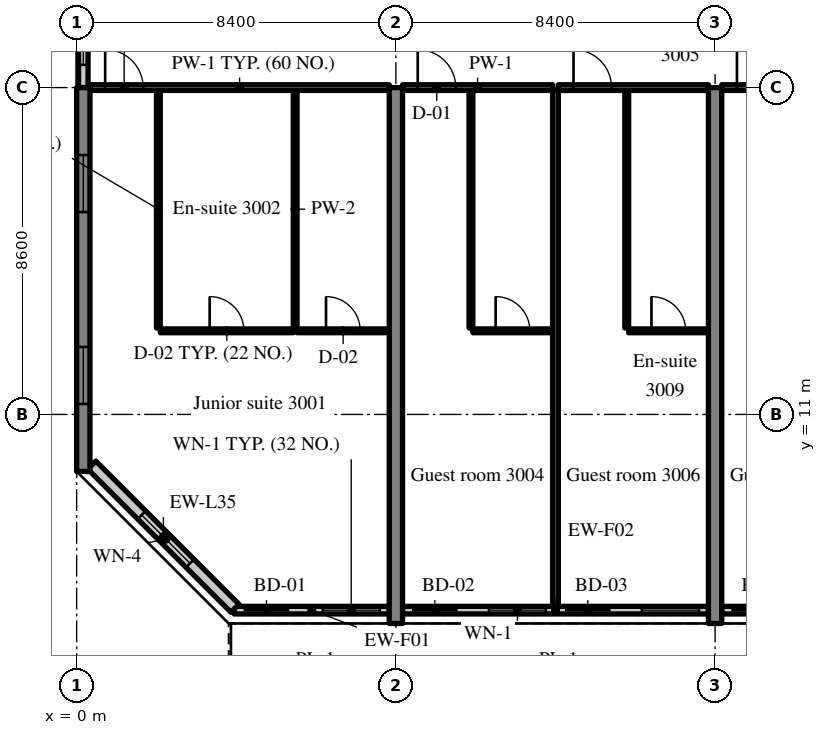
"""IFC4 building model, lengths in metres.
Left out: names, types, materials, properties, quantities, classifications, styles, units other than length and angle.
Written with IfcOpenShell. Run it as: python <this file> out.ifc"""

import sys

from ifc_helpers import new_model, si_unit, direction, frame, frame_2d, origin, place, context, subcontext, project, spatial, rectangle, extrude, source, transform, mapped, element, fill, save


model = new_model("IFC4")
c1 = context("Model", 3, precision=1e-05, world=origin(), true_north=direction((0.0, 1.0)))
c2 = subcontext(c1, "Body", "Model", "MODEL_VIEW")
j1 = project(units=[si_unit("LENGTHUNIT", "METRE"), si_unit("PLANEANGLEUNIT", "RADIAN")], contexts=[c1])
p1 = place(None, origin())
s1 = spatial("IfcSite", under=j1, at=p1, CompositionType="ELEMENT")
p2 = place(p1, origin())
s2 = spatial("IfcBuilding", under=s1, at=p2, CompositionType="ELEMENT")
p3 = place(p2, frame((0.0, 0.0, 125.6)))
s3 = spatial("IfcBuildingStorey", under=s2, at=p3, CompositionType="ELEMENT", Elevation=125.6)
m1 = source(origin(), c2, "Body", "SweptSolid", [
    extrude(rectangle(XDim=10.1, YDim=0.35, at=frame_2d((5.05, 0.0))), origin(), (0.0, 0.0, 1.0), 3.52),
])
p4 = place(p3, frame((0.175, 9.5, 0.0), z_axis=(0.0, 0.0, 1.0), x_axis=(0.0, 1.0, 0.0)))
e1 = element("IfcWall", 1, at=p4, inside=s3, PredefinedType="SHEAR", context=c2, shape_type="MappedRepresentation", body=[
    mapped(m1, transform((0.0, 0.0, 0.0), scale=1.0)),
])
m2 = source(origin(), c2, "Body", "SweptSolid", [
    extrude(rectangle(XDim=1.5, YDim=1.5, at=frame_2d((0.75, 0.75))), frame((0.0, 0.185, 0.0), z_axis=(0.0, -1.0, 0.0), x_axis=(1.0, 0.0, 0.0)), (0.0, 0.0, 1.0), 0.37),
])
p5 = place(p4, frame((1.775, 0.0, 0.9)))
e2 = element("IfcOpeningElement", 2, at=p5, cuts=e1, PredefinedType="OPENING", context=c2, shape_type="MappedRepresentation", body=[
    mapped(m2, transform((0.0, 0.0, 0.0), scale=1.0)),
])
p6 = place(p4, frame((6.825, 0.0, 0.9)))
e3 = element("IfcOpeningElement", 3, at=p6, cuts=e1, PredefinedType="OPENING", context=c2, shape_type="MappedRepresentation", body=[
    mapped(m2, transform((0.0, 0.0, 0.0), scale=1.0)),
])
m3 = source(origin(), c2, "Body", "SweptSolid", [
    extrude(rectangle(XDim=14.1, YDim=0.35, at=frame_2d((7.05, 0.0))), origin(), (0.0, 0.0, 1.0), 3.52),
])
for number, where, z_axis, x_axis in (
    (4, (8.4, 5.5, 0.0), (0.0, 0.0, 1.0), (0.0, 1.0, 0.0)),
    (5, (16.8, 5.5, 0.0), (0.0, 0.0, 1.0), (0.0, 1.0, 0.0)),
):
    element("IfcWall", number, at=place(p3, frame(where, z_axis=z_axis, x_axis=x_axis)), inside=s3, PredefinedType="SHEAR", context=c2, shape_type="MappedRepresentation", body=[
        mapped(m3, transform((0.0, 0.0, 0.0), scale=1.0)),
    ])
m4 = source(origin(), c2, "Body", "SweptSolid", [
    extrude(rectangle(XDim=4.08, YDim=0.2, at=frame_2d((2.04, 0.0))), origin(), (0.0, 0.0, 1.0), 2.82),
])
p7 = place(p3, frame((4.145, 5.85, 0.0), z_axis=(0.0, 0.0, 1.0), x_axis=(1.0, 0.0, 0.0)))
e6 = element("IfcWall", 6, at=p7, inside=s3, PredefinedType="SOLIDWALL", context=c2, shape_type="MappedRepresentation", body=[
    mapped(m4, transform((0.0, 0.0, 0.0), scale=1.0)),
])
m5 = source(origin(), c2, "Body", "SweptSolid", [
    extrude(rectangle(XDim=1.2, YDim=2.4, at=frame_2d((0.6, 1.2))), frame((0.0, 0.11, 0.0), z_axis=(0.0, -1.0, 0.0), x_axis=(1.0, 0.0, 0.0)), (0.0, 0.0, 1.0), 0.22),
])
p8 = place(p7, frame((0.25, 0.0, 0.0)))
e7 = element("IfcOpeningElement", 7, at=p8, cuts=e6, PredefinedType="OPENING", context=c2, shape_type="MappedRepresentation", body=[
    mapped(m5, transform((0.0, 0.0, 0.0), scale=1.0)),
])
m6 = source(origin(), c2, "Body", "SweptSolid", [
    extrude(rectangle(XDim=1.5, YDim=1.5, at=frame_2d((0.75, 0.75))), frame((0.0, 0.11, 0.0), z_axis=(0.0, -1.0, 0.0), x_axis=(1.0, 0.0, 0.0)), (0.0, 0.0, 1.0), 0.22),
])
p9 = place(p7, frame((2.33, 0.0, 0.9)))
e8 = element("IfcOpeningElement", 8, at=p9, cuts=e6, PredefinedType="OPENING", context=c2, shape_type="MappedRepresentation", body=[
    mapped(m6, transform((0.0, 0.0, 0.0), scale=1.0)),
])
m7 = source(origin(), c2, "Body", "SweptSolid", [
    extrude(rectangle(XDim=8.05, YDim=0.2, at=frame_2d((4.025, 0.0))), origin(), (0.0, 0.0, 1.0), 2.82),
])
p10 = place(p3, frame((8.575, 5.85, 0.0), z_axis=(0.0, 0.0, 1.0), x_axis=(1.0, 0.0, 0.0)))
e9 = element("IfcWall", 9, at=p10, inside=s3, PredefinedType="SOLIDWALL", context=c2, shape_type="MappedRepresentation", body=[
    mapped(m7, transform((0.0, 0.0, 0.0), scale=1.0)),
])
p11 = place(p10, frame((0.25, 0.0, 0.0)))
e10 = element("IfcOpeningElement", 10, at=p11, cuts=e9, PredefinedType="OPENING", context=c2, shape_type="MappedRepresentation", body=[
    mapped(m5, transform((0.0, 0.0, 0.0), scale=1.0)),
])
p12 = place(p10, frame((2.275, 0.0, 0.9)))
e11 = element("IfcOpeningElement", 11, at=p12, cuts=e9, PredefinedType="OPENING", context=c2, shape_type="MappedRepresentation", body=[
    mapped(m6, transform((0.0, 0.0, 0.0), scale=1.0)),
])
p13 = place(p10, frame((4.275, 0.0, 0.0)))
e12 = element("IfcOpeningElement", 12, at=p13, cuts=e9, PredefinedType="OPENING", context=c2, shape_type="MappedRepresentation", body=[
    mapped(m5, transform((0.0, 0.0, 0.0), scale=1.0)),
])
p14 = place(p10, frame((6.3, 0.0, 0.9)))
e13 = element("IfcOpeningElement", 13, at=p14, cuts=e9, PredefinedType="OPENING", context=c2, shape_type="MappedRepresentation", body=[
    mapped(m6, transform((0.0, 0.0, 0.0), scale=1.0)),
])
m8 = source(origin(), c2, "Body", "SweptSolid", [
    extrude(rectangle(XDim=8.05, YDim=0.2, at=frame_2d((4.025, 0.0))), origin(), (0.0, 0.0, 1.0), 2.82),
])
p15 = place(p3, frame((16.975, 5.85, 0.0), z_axis=(0.0, 0.0, 1.0), x_axis=(1.0, 0.0, 0.0)))
e14 = element("IfcWall", 14, at=p15, inside=s3, PredefinedType="SOLIDWALL", context=c2, shape_type="MappedRepresentation", body=[
    mapped(m8, transform((0.0, 0.0, 0.0), scale=1.0)),
])
p16 = place(p15, frame((0.25, 0.0, 0.0)))
e15 = element("IfcOpeningElement", 15, at=p16, cuts=e14, PredefinedType="OPENING", context=c2, shape_type="MappedRepresentation", body=[
    mapped(m5, transform((0.0, 0.0, 0.0), scale=1.0)),
])
p17 = place(p15, frame((2.275, 0.0, 0.9)))
e16 = element("IfcOpeningElement", 16, at=p17, cuts=e14, PredefinedType="OPENING", context=c2, shape_type="MappedRepresentation", body=[
    mapped(m6, transform((0.0, 0.0, 0.0), scale=1.0)),
])
p18 = place(p15, frame((4.275, 0.0, 0.0)))
e17 = element("IfcOpeningElement", 17, at=p18, cuts=e14, PredefinedType="OPENING", context=c2, shape_type="MappedRepresentation", body=[
    mapped(m5, transform((0.0, 0.0, 0.0), scale=1.0)),
])
p19 = place(p15, frame((6.3, 0.0, 0.9)))
e18 = element("IfcOpeningElement", 18, at=p19, cuts=e14, PredefinedType="OPENING", context=c2, shape_type="MappedRepresentation", body=[
    mapped(m6, transform((0.0, 0.0, 0.0), scale=1.0)),
])
m9 = source(origin(), c2, "Body", "SweptSolid", [
    extrude(rectangle(XDim=5.326, YDim=0.3, at=frame_2d((2.663, 0.0))), origin(), (0.0, 0.0, 1.0), 3.52),
])
p20 = place(p3, frame((0.4, 9.666, 0.0), z_axis=(0.0, 0.0, 1.0), x_axis=(0.707106781187, -0.707106781187, 0.0)))
e19 = element("IfcWall", 19, at=p20, inside=s3, PredefinedType="SOLIDWALL", context=c2, shape_type="MappedRepresentation", body=[
    mapped(m9, transform((0.0, 0.0, 0.0), scale=1.0)),
])
m10 = source(origin(), c2, "Body", "SweptSolid", [
    extrude(rectangle(XDim=1.8, YDim=1.5, at=frame_2d((0.9, 0.75))), frame((0.0, 0.16, 0.0), z_axis=(0.0, -1.0, 0.0), x_axis=(1.0, 0.0, 0.0)), (0.0, 0.0, 1.0), 0.32),
])
p21 = place(p20, frame((1.854, 0.0, 0.9)))
e20 = element("IfcOpeningElement", 20, at=p21, cuts=e19, PredefinedType="OPENING", context=c2, shape_type="MappedRepresentation", body=[
    mapped(m10, transform((0.0, 0.0, 0.0), scale=1.0)),
])
m11 = source(origin(), c2, "Body", "SweptSolid", [
    extrude(rectangle(XDim=2.4, YDim=0.25, at=frame_2d((1.2, 0.0))), origin(), (0.0, 0.0, 1.0), 2.62),
])
p22 = place(p3, frame((0.175, 19.6, 0.0), z_axis=(0.0, 0.0, 1.0), x_axis=(0.0, 1.0, 0.0)))
e21 = element("IfcWall", 21, at=p22, inside=s3, PredefinedType="SOLIDWALL", context=c2, shape_type="MappedRepresentation", body=[
    mapped(m11, transform((0.0, 0.0, 0.0), scale=1.0)),
])
m12 = source(origin(), c2, "Body", "SweptSolid", [
    extrude(rectangle(XDim=1.2, YDim=1.5, at=frame_2d((0.6, 0.75))), frame((0.0, 0.135, 0.0), z_axis=(0.0, -1.0, 0.0), x_axis=(1.0, 0.0, 0.0)), (0.0, 0.0, 1.0), 0.27),
])
p23 = place(p22, frame((0.6, 0.0, 0.9)))
e22 = element("IfcOpeningElement", 22, at=p23, cuts=e21, PredefinedType="OPENING", context=c2, shape_type="MappedRepresentation", body=[
    mapped(m12, transform((0.0, 0.0, 0.0), scale=1.0)),
])
m13 = source(origin(), c2, "Body", "SweptSolid", [
    extrude(rectangle(XDim=6.25, YDim=0.1, at=frame_2d((3.125, 0.0))), origin(), (0.0, 0.0, 1.0), 3.52),
])
for number, where, z_axis, x_axis in (
    (23, (2.15, 13.275, 0.0), (0.0, 0.0, 1.0), (0.0, 1.0, 0.0)),
    (24, (5.75, 13.275, 0.0), (0.0, 0.0, 1.0), (0.0, 1.0, 0.0)),
):
    element("IfcWall", number, at=place(p3, frame(where, z_axis=z_axis, x_axis=x_axis)), inside=s3, PredefinedType="PARTITIONING", context=c2, shape_type="MappedRepresentation", body=[
        mapped(m13, transform((0.0, 0.0, 0.0), scale=1.0)),
    ])
m14 = source(origin(), c2, "Body", "SweptSolid", [
    extrude(rectangle(XDim=3.5, YDim=0.1, at=frame_2d((1.75, 0.0))), origin(), (0.0, 0.0, 1.0), 3.52),
])
p24 = place(p3, frame((2.2, 13.2, 0.0), z_axis=(0.0, 0.0, 1.0), x_axis=(1.0, 0.0, 0.0)))
e25 = element("IfcWall", 25, at=p24, inside=s3, PredefinedType="PARTITIONING", context=c2, shape_type="MappedRepresentation", body=[
    mapped(m14, transform((0.0, 0.0, 0.0), scale=1.0)),
])
m15 = source(origin(), c2, "Body", "SweptSolid", [
    extrude(rectangle(XDim=0.9, YDim=2.1, at=frame_2d((0.45, 1.05))), frame((0.0, 0.06, 0.0), z_axis=(0.0, -1.0, 0.0), x_axis=(1.0, 0.0, 0.0)), (0.0, 0.0, 1.0), 0.12),
])
p25 = place(p24, frame((1.3, 0.0, 0.0)))
e26 = element("IfcOpeningElement", 26, at=p25, cuts=e25, PredefinedType="OPENING", context=c2, shape_type="MappedRepresentation", body=[
    mapped(m15, transform((0.0, 0.0, 0.0), scale=1.0)),
])
m16 = source(origin(), c2, "Body", "SweptSolid", [
    extrude(rectangle(XDim=2.425, YDim=0.1, at=frame_2d((1.212, 0.0))), origin(), (0.0, 0.0, 1.0), 3.52),
])
p26 = place(p3, frame((5.8, 13.2, 0.0), z_axis=(0.0, 0.0, 1.0), x_axis=(1.0, 0.0, 0.0)))
e27 = element("IfcWall", 27, at=p26, inside=s3, PredefinedType="PARTITIONING", context=c2, shape_type="MappedRepresentation", body=[
    mapped(m16, transform((0.0, 0.0, 0.0), scale=1.0)),
])
p27 = place(p26, frame((0.762, 0.0, 0.0)))
e28 = element("IfcOpeningElement", 28, at=p27, cuts=e27, PredefinedType="OPENING", context=c2, shape_type="MappedRepresentation", body=[
    mapped(m15, transform((0.0, 0.0, 0.0), scale=1.0)),
])
m17 = source(origin(), c2, "Body", "SweptSolid", [
    extrude(rectangle(XDim=7.875, YDim=0.15, at=frame_2d((3.938, 0.0))), origin(), (0.0, 0.0, 1.0), 2.82),
])
p28 = place(p3, frame((0.35, 19.6, 0.0), z_axis=(0.0, 0.0, 1.0), x_axis=(1.0, 0.0, 0.0)))
e29 = element("IfcWall", 29, at=p28, inside=s3, PredefinedType="PARTITIONING", context=c2, shape_type="MappedRepresentation", body=[
    mapped(m17, transform((0.0, 0.0, 0.0), scale=1.0)),
])
m18 = source(origin(), c2, "Body", "SweptSolid", [
    extrude(rectangle(XDim=1.0, YDim=2.1, at=frame_2d((0.5, 1.05))), frame((0.0, 0.085, 0.0), z_axis=(0.0, -1.0, 0.0), x_axis=(1.0, 0.0, 0.0)), (0.0, 0.0, 1.0), 0.17),
])
p29 = place(p28, frame((0.4, 0.0, 0.0)))
e30 = element("IfcOpeningElement", 30, at=p29, cuts=e29, PredefinedType="OPENING", context=c2, shape_type="MappedRepresentation", body=[
    mapped(m18, transform((0.0, 0.0, 0.0), scale=1.0)),
])
p30 = place(p3, frame((10.375, 13.275, 0.0), z_axis=(0.0, 0.0, 1.0), x_axis=(0.0, 1.0, 0.0)))
e31 = element("IfcWall", 31, at=p30, inside=s3, PredefinedType="PARTITIONING", context=c2, shape_type="MappedRepresentation", body=[
    mapped(m13, transform((0.0, 0.0, 0.0), scale=1.0)),
])
m19 = source(origin(), c2, "Body", "SweptSolid", [
    extrude(rectangle(XDim=2.1, YDim=0.1, at=frame_2d((1.05, 0.0))), origin(), (0.0, 0.0, 1.0), 3.52),
])
p31 = place(p3, frame((10.425, 13.2, 0.0), z_axis=(0.0, 0.0, 1.0), x_axis=(1.0, 0.0, 0.0)))
e32 = element("IfcWall", 32, at=p31, inside=s3, PredefinedType="PARTITIONING", context=c2, shape_type="MappedRepresentation", body=[
    mapped(m19, transform((0.0, 0.0, 0.0), scale=1.0)),
])
p32 = place(p31, frame((0.6, 0.0, 0.0)))
e33 = element("IfcOpeningElement", 33, at=p32, cuts=e32, PredefinedType="OPENING", context=c2, shape_type="MappedRepresentation", body=[
    mapped(m15, transform((0.0, 0.0, 0.0), scale=1.0)),
])
m20 = source(origin(), c2, "Body", "SweptSolid", [
    extrude(rectangle(XDim=3.95, YDim=0.15, at=frame_2d((1.975, 0.0))), origin(), (0.0, 0.0, 1.0), 2.82),
])
p33 = place(p3, frame((8.575, 19.6, 0.0), z_axis=(0.0, 0.0, 1.0), x_axis=(1.0, 0.0, 0.0)))
e34 = element("IfcWall", 34, at=p33, inside=s3, PredefinedType="PARTITIONING", context=c2, shape_type="MappedRepresentation", body=[
    mapped(m20, transform((0.0, 0.0, 0.0), scale=1.0)),
])
p34 = place(p33, frame((0.4, 0.0, 0.0)))
e35 = element("IfcOpeningElement", 35, at=p34, cuts=e34, PredefinedType="OPENING", context=c2, shape_type="MappedRepresentation", body=[
    mapped(m18, transform((0.0, 0.0, 0.0), scale=1.0)),
])
p35 = place(p3, frame((14.475, 13.275, 0.0), z_axis=(0.0, 0.0, 1.0), x_axis=(0.0, 1.0, 0.0)))
e36 = element("IfcWall", 36, at=p35, inside=s3, PredefinedType="PARTITIONING", context=c2, shape_type="MappedRepresentation", body=[
    mapped(m13, transform((0.0, 0.0, 0.0), scale=1.0)),
])
m21 = source(origin(), c2, "Body", "SweptSolid", [
    extrude(rectangle(XDim=2.1, YDim=0.1, at=frame_2d((1.05, 0.0))), origin(), (0.0, 0.0, 1.0), 3.52),
])
p36 = place(p3, frame((14.525, 13.2, 0.0), z_axis=(0.0, 0.0, 1.0), x_axis=(1.0, 0.0, 0.0)))
e37 = element("IfcWall", 37, at=p36, inside=s3, PredefinedType="PARTITIONING", context=c2, shape_type="MappedRepresentation", body=[
    mapped(m21, transform((0.0, 0.0, 0.0), scale=1.0)),
])
p37 = place(p36, frame((0.6, 0.0, 0.0)))
e38 = element("IfcOpeningElement", 38, at=p37, cuts=e37, PredefinedType="OPENING", context=c2, shape_type="MappedRepresentation", body=[
    mapped(m15, transform((0.0, 0.0, 0.0), scale=1.0)),
])
p38 = place(p3, frame((12.675, 19.6, 0.0), z_axis=(0.0, 0.0, 1.0), x_axis=(1.0, 0.0, 0.0)))
e39 = element("IfcWall", 39, at=p38, inside=s3, PredefinedType="PARTITIONING", context=c2, shape_type="MappedRepresentation", body=[
    mapped(m20, transform((0.0, 0.0, 0.0), scale=1.0)),
])
p39 = place(p38, frame((0.4, 0.0, 0.0)))
e40 = element("IfcOpeningElement", 40, at=p39, cuts=e39, PredefinedType="OPENING", context=c2, shape_type="MappedRepresentation", body=[
    mapped(m18, transform((0.0, 0.0, 0.0), scale=1.0)),
])
m22 = source(origin(), c2, "Body", "SweptSolid", [
    extrude(rectangle(XDim=13.575, YDim=0.15, at=frame_2d((6.788, 0.0))), origin(), (0.0, 0.0, 1.0), 3.52),
])
p40 = place(p3, frame((12.6, 5.95, 0.0), z_axis=(0.0, 0.0, 1.0), x_axis=(0.0, 1.0, 0.0)))
e41 = element("IfcWall", 41, at=p40, inside=s3, PredefinedType="PARTITIONING", context=c2, shape_type="MappedRepresentation", body=[
    mapped(m22, transform((0.0, 0.0, 0.0), scale=1.0)),
])
p41 = place(p3, frame((16.975, 19.6, 0.0), z_axis=(0.0, 0.0, 1.0), x_axis=(1.0, 0.0, 0.0)))
e42 = element("IfcWall", 42, at=p41, inside=s3, PredefinedType="PARTITIONING", context=c2, shape_type="MappedRepresentation", body=[
    mapped(m20, transform((0.0, 0.0, 0.0), scale=1.0)),
])
p42 = place(p41, frame((0.4, 0.0, 0.0)))
e43 = element("IfcOpeningElement", 43, at=p42, cuts=e42, PredefinedType="OPENING", context=c2, shape_type="MappedRepresentation", body=[
    mapped(m18, transform((0.0, 0.0, 0.0), scale=1.0)),
])
m23 = source(origin(), c2, "Body", "SweptSolid", [
    extrude(rectangle(XDim=1.2, YDim=2.4, at=frame_2d((0.6, 1.2))), frame((0.0, 0.025, 0.0), z_axis=(0.0, -1.0, 0.0), x_axis=(1.0, 0.0, 0.0)), (0.0, 0.0, 1.0), 0.05),
])
p43 = place(p8, origin())
e44 = element("IfcDoor", 44, at=p43, inside=s3, OperationType="SLIDING_TO_LEFT", PredefinedType="DOOR", context=c2, shape_type="MappedRepresentation", body=[
    mapped(m23, transform((0.0, 0.0, 0.0), scale=1.0)),
])
fill(e7, e44)
m24 = source(origin(), c2, "Body", "SweptSolid", [
    extrude(rectangle(XDim=1.5, YDim=1.5, at=frame_2d((0.75, 0.75))), frame((0.0, 0.03, 0.0), z_axis=(0.0, -1.0, 0.0), x_axis=(1.0, 0.0, 0.0)), (0.0, 0.0, 1.0), 0.06),
])
p44 = place(p9, origin())
e45 = element("IfcWindow", 45, at=p44, inside=s3, PartitioningType="SINGLE_PANEL", PredefinedType="WINDOW", context=c2, shape_type="MappedRepresentation", body=[
    mapped(m24, transform((0.0, 0.0, 0.0), scale=1.0)),
])
fill(e8, e45)
p45 = place(p11, origin())
e46 = element("IfcDoor", 46, at=p45, inside=s3, OperationType="SLIDING_TO_RIGHT", PredefinedType="DOOR", context=c2, shape_type="MappedRepresentation", body=[
    mapped(m23, transform((0.0, 0.0, 0.0), scale=1.0)),
])
fill(e10, e46)
p46 = place(p12, origin())
e47 = element("IfcWindow", 47, at=p46, inside=s3, PartitioningType="SINGLE_PANEL", PredefinedType="WINDOW", context=c2, shape_type="MappedRepresentation", body=[
    mapped(m24, transform((0.0, 0.0, 0.0), scale=1.0)),
])
fill(e11, e47)
p47 = place(p13, origin())
e48 = element("IfcDoor", 48, at=p47, inside=s3, OperationType="SLIDING_TO_LEFT", PredefinedType="DOOR", context=c2, shape_type="MappedRepresentation", body=[
    mapped(m23, transform((0.0, 0.0, 0.0), scale=1.0)),
])
fill(e12, e48)
p48 = place(p14, origin())
e49 = element("IfcWindow", 49, at=p48, inside=s3, PartitioningType="SINGLE_PANEL", PredefinedType="WINDOW", context=c2, shape_type="MappedRepresentation", body=[
    mapped(m24, transform((0.0, 0.0, 0.0), scale=1.0)),
])
fill(e13, e49)
p49 = place(p16, origin())
e50 = element("IfcDoor", 50, at=p49, inside=s3, OperationType="SLIDING_TO_RIGHT", PredefinedType="DOOR", context=c2, shape_type="MappedRepresentation", body=[
    mapped(m23, transform((0.0, 0.0, 0.0), scale=1.0)),
])
fill(e15, e50)
m25 = source(origin(), c2, "Body", "SweptSolid", [
    extrude(rectangle(XDim=1.8, YDim=1.5, at=frame_2d((0.9, 0.75))), frame((0.0, 0.03, 0.0), z_axis=(0.0, -1.0, 0.0), x_axis=(1.0, 0.0, 0.0)), (0.0, 0.0, 1.0), 0.06),
])
p50 = place(p21, origin())
e51 = element("IfcWindow", 51, at=p50, inside=s3, PartitioningType="SINGLE_PANEL", PredefinedType="WINDOW", context=c2, shape_type="MappedRepresentation", body=[
    mapped(m25, transform((0.0, 0.0, 0.0), scale=1.0)),
])
fill(e20, e51)
p51 = place(p5, origin())
e52 = element("IfcWindow", 52, at=p51, inside=s3, PartitioningType="SINGLE_PANEL", PredefinedType="WINDOW", context=c2, shape_type="MappedRepresentation", body=[
    mapped(m24, transform((0.0, 0.0, 0.0), scale=1.0)),
])
fill(e2, e52)
p52 = place(p6, origin())
e53 = element("IfcWindow", 53, at=p52, inside=s3, PartitioningType="SINGLE_PANEL", PredefinedType="WINDOW", context=c2, shape_type="MappedRepresentation", body=[
    mapped(m24, transform((0.0, 0.0, 0.0), scale=1.0)),
])
fill(e3, e53)
m26 = source(origin(), c2, "Body", "SweptSolid", [
    extrude(rectangle(XDim=1.2, YDim=1.5, at=frame_2d((0.6, 0.75))), frame((0.0, 0.03, 0.0), z_axis=(0.0, -1.0, 0.0), x_axis=(1.0, 0.0, 0.0)), (0.0, 0.0, 1.0), 0.06),
])
p53 = place(p23, origin())
e54 = element("IfcWindow", 54, at=p53, inside=s3, PartitioningType="SINGLE_PANEL", PredefinedType="WINDOW", context=c2, shape_type="MappedRepresentation", body=[
    mapped(m26, transform((0.0, 0.0, 0.0), scale=1.0)),
])
fill(e22, e54)
m27 = source(origin(), c2, "Body", "SweptSolid", [
    extrude(rectangle(XDim=0.9, YDim=2.1, at=frame_2d((0.45, 1.05))), frame((0.0, 0.025, 0.0), z_axis=(0.0, -1.0, 0.0), x_axis=(1.0, 0.0, 0.0)), (0.0, 0.0, 1.0), 0.05),
])
p54 = place(p25, origin())
e55 = element("IfcDoor", 55, at=p54, inside=s3, OperationType="SINGLE_SWING_LEFT", PredefinedType="DOOR", context=c2, shape_type="MappedRepresentation", body=[
    mapped(m27, transform((0.0, 0.0, 0.0), scale=1.0)),
])
fill(e26, e55)
p55 = place(p27, origin())
e56 = element("IfcDoor", 56, at=p55, inside=s3, OperationType="SINGLE_SWING_LEFT", PredefinedType="DOOR", context=c2, shape_type="MappedRepresentation", body=[
    mapped(m27, transform((0.0, 0.0, 0.0), scale=1.0)),
])
fill(e28, e56)
m28 = source(origin(), c2, "Body", "SweptSolid", [
    extrude(rectangle(XDim=1.0, YDim=2.1, at=frame_2d((0.5, 1.05))), frame((0.0, 0.025, 0.0), z_axis=(0.0, -1.0, 0.0), x_axis=(1.0, 0.0, 0.0)), (0.0, 0.0, 1.0), 0.05),
])
p56 = place(p29, origin())
e57 = element("IfcDoor", 57, at=p56, inside=s3, OperationType="SINGLE_SWING_LEFT", PredefinedType="DOOR", context=c2, shape_type="MappedRepresentation", body=[
    mapped(m28, transform((0.0, 0.0, 0.0), scale=1.0)),
])
fill(e30, e57)
p57 = place(p32, origin())
e58 = element("IfcDoor", 58, at=p57, inside=s3, OperationType="SINGLE_SWING_LEFT", PredefinedType="DOOR", context=c2, shape_type="MappedRepresentation", body=[
    mapped(m27, transform((0.0, 0.0, 0.0), scale=1.0)),
])
fill(e33, e58)
p58 = place(p34, origin())
e59 = element("IfcDoor", 59, at=p58, inside=s3, OperationType="SINGLE_SWING_LEFT", PredefinedType="DOOR", context=c2, shape_type="MappedRepresentation", body=[
    mapped(m28, transform((0.0, 0.0, 0.0), scale=1.0)),
])
fill(e35, e59)
p59 = place(p37, origin())
e60 = element("IfcDoor", 60, at=p59, inside=s3, OperationType="SINGLE_SWING_LEFT", PredefinedType="DOOR", context=c2, shape_type="MappedRepresentation", body=[
    mapped(m27, transform((0.0, 0.0, 0.0), scale=1.0)),
])
fill(e38, e60)
p60 = place(p39, origin())
e61 = element("IfcDoor", 61, at=p60, inside=s3, OperationType="SINGLE_SWING_LEFT", PredefinedType="DOOR", context=c2, shape_type="MappedRepresentation", body=[
    mapped(m28, transform((0.0, 0.0, 0.0), scale=1.0)),
])
fill(e40, e61)
p61 = place(p42, origin())
e62 = element("IfcDoor", 62, at=p61, inside=s3, OperationType="SINGLE_SWING_LEFT", PredefinedType="DOOR", context=c2, shape_type="MappedRepresentation", body=[
    mapped(m28, transform((0.0, 0.0, 0.0), scale=1.0)),
])
fill(e43, e62)
save(model, sys.argv[1])
